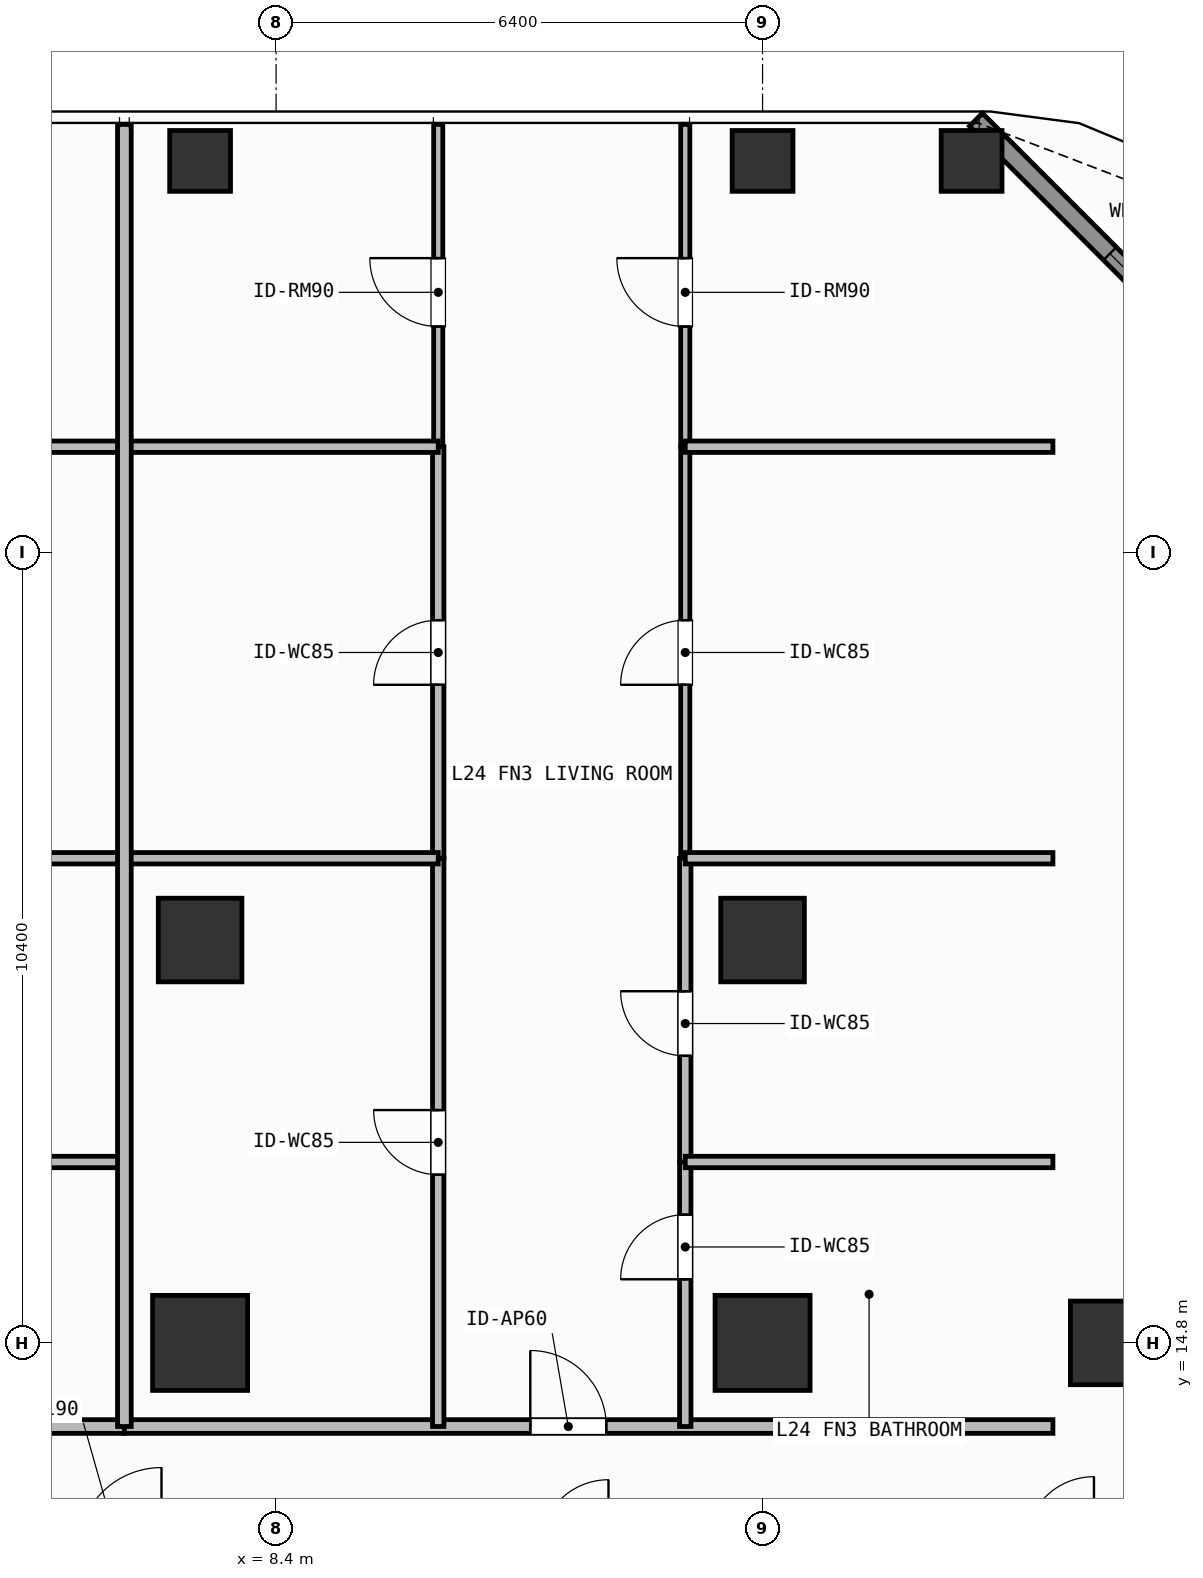
"""IFC4 building model, lengths in metres.
Left out: names, types, materials, properties, quantities, classifications, styles, units other than length and angle.
Written with IfcOpenShell. Run it as: python <this file> out.ifc"""

import sys

from ifc_helpers import new_model, si_unit, direction, frame, frame_2d, origin, origin_2d, place, context, subcontext, project, spatial, rectangle, hollow_rectangle, extrude, element, fill, save


model = new_model("IFC4")
c1 = context("Model", 3, precision=1e-05, world=origin(), true_north=direction((0.0, 1.0)))
c2 = subcontext(c1, "Body", "Model", "MODEL_VIEW")
j1 = project(units=[si_unit("LENGTHUNIT", "METRE"), si_unit("PLANEANGLEUNIT", "RADIAN")], contexts=[c1])
p1 = place(None, origin())
s1 = spatial("IfcSite", under=j1, at=p1, CompositionType="ELEMENT")
p2 = place(p1, origin())
s2 = spatial("IfcBuilding", under=s1, at=p2, CompositionType="ELEMENT")
p3 = place(p2, frame((0.0, 0.0, 96.9)))
s3 = spatial("IfcBuildingStorey", under=s2, at=p3, CompositionType="ELEMENT", Elevation=96.9)
for number, where, z_axis, x_axis in (
    (1, (7.4, 14.8, 0.0), (0.0, 0.0, 1.0), (1.0, 0.0, 0.0)),
    (2, (14.8, 14.8, 0.0), (0.0, 0.0, 1.0), (1.0, 0.0, 0.0)),
):
    element("IfcColumn", number, at=place(p3, frame(where, z_axis=z_axis, x_axis=x_axis)), inside=s3, PredefinedType="COLUMN", context=c2, shape_type="SweptSolid", body=[
        extrude(rectangle(XDim=1.25, YDim=1.25, at=origin_2d()), origin(), (0.0, 0.0, 1.0), 3.9),
    ])
for number, where, z_axis, x_axis in (
    (3, (19.4, 14.8, 0.0), (0.0, 0.0, 1.0), (1.0, 0.0, 0.0)),
    (4, (7.4, 20.1, 0.0), (0.0, 0.0, 1.0), (1.0, 0.0, 0.0)),
    (5, (14.8, 20.1, 0.0), (0.0, 0.0, 1.0), (1.0, 0.0, 0.0)),
):
    element("IfcColumn", number, at=place(p3, frame(where, z_axis=z_axis, x_axis=x_axis)), inside=s3, PredefinedType="COLUMN", context=c2, shape_type="SweptSolid", body=[
        extrude(rectangle(XDim=1.1, YDim=1.1, at=origin_2d()), origin(), (0.0, 0.0, 1.0), 3.9),
    ])
for number, where, z_axis, x_axis in (
    (6, (17.55, 30.35, 0.0), (0.0, 0.0, 1.0), (1.0, 0.0, 0.0)),
    (7, (7.4, 30.35, 0.0), (0.0, 0.0, 1.0), (1.0, 0.0, 0.0)),
    (8, (14.8, 30.35, 0.0), (0.0, 0.0, 1.0), (1.0, 0.0, 0.0)),
):
    element("IfcColumn", number, at=place(p3, frame(where, z_axis=z_axis, x_axis=x_axis)), inside=s3, PredefinedType="COLUMN", context=c2, shape_type="SweptSolid", body=[
        extrude(hollow_rectangle(XDim=0.8, YDim=0.8, WallThickness=0.036, at=origin_2d()), origin(), (0.0, 0.0, 1.0), 3.9),
    ])
p4 = place(p3, frame((17.608, 30.892, 0.0), z_axis=(0.0, 0.0, 1.0), x_axis=(0.707106781187, -0.707106781187, 0.0)))
e9 = element("IfcWall", 9, at=p4, inside=s3, PredefinedType="SOLIDWALL", context=c2, shape_type="SweptSolid", body=[
    extrude(rectangle(XDim=6.484, YDim=0.24, at=frame_2d((3.242, 0.0))), origin(), (0.0, 0.0, 1.0), 3.68),
])
p5 = place(p4, frame((2.492, 0.0, 0.8)))
e10 = element("IfcOpeningElement", 10, at=p5, cuts=e9, PredefinedType="OPENING", context=c2, shape_type="SweptSolid", body=[
    extrude(rectangle(XDim=1.5, YDim=1.85, at=frame_2d((0.75, 0.925))), frame((0.0, 0.13, 0.0), z_axis=(0.0, -1.0, 0.0), x_axis=(1.0, 0.0, 0.0)), (0.0, 0.0, 1.0), 0.26),
])
p6 = place(p3, frame((-14.808, 13.7, 0.0), z_axis=(0.0, 0.0, 1.0), x_axis=(1.0, 0.0, 0.0)))
e11 = element("IfcWall", 11, at=p6, inside=s3, PredefinedType="PARTITIONING", context=c2, shape_type="SweptSolid", body=[
    extrude(rectangle(XDim=21.212, YDim=0.18, at=frame_2d((10.606, 0.0))), origin(), (0.0, 0.0, 1.0), 3.68),
])
p7 = place(p6, frame((11.271, 0.0, 0.0)))
e12 = element("IfcOpeningElement", 12, at=p7, cuts=e11, PredefinedType="OPENING", context=c2, shape_type="SweptSolid", body=[
    extrude(rectangle(XDim=1.0, YDim=2.2, at=frame_2d((0.5, 1.1))), frame((0.0, 0.1, 0.0), z_axis=(0.0, -1.0, 0.0), x_axis=(1.0, 0.0, 0.0)), (0.0, 0.0, 1.0), 0.2),
])
p8 = place(p3, frame((6.404, 13.7, 0.0), z_axis=(0.0, 0.0, 1.0), x_axis=(1.0, 0.0, 0.0)))
e13 = element("IfcWall", 13, at=p8, inside=s3, PredefinedType="PARTITIONING", context=c2, shape_type="SweptSolid", body=[
    extrude(rectangle(XDim=12.216, YDim=0.18, at=frame_2d((6.108, 0.0))), origin(), (0.0, 0.0, 1.0), 3.68),
])
p9 = place(p8, frame((5.34, 0.0, 0.0)))
e14 = element("IfcOpeningElement", 14, at=p9, cuts=e13, PredefinedType="OPENING", context=c2, shape_type="SweptSolid", body=[
    extrude(rectangle(XDim=1.0, YDim=2.2, at=frame_2d((0.5, 1.1))), frame((0.0, 0.1, 0.0), z_axis=(0.0, -1.0, 0.0), x_axis=(1.0, 0.0, 0.0)), (0.0, 0.0, 1.0), 0.2),
])
p10 = place(p3, frame((10.533, 13.7, 0.0), z_axis=(0.0, 0.0, 1.0), x_axis=(0.0, 1.0, 0.0)))
e15 = element("IfcWall", 15, at=p10, inside=s3, PredefinedType="PARTITIONING", context=c2, shape_type="SweptSolid", body=[
    extrude(rectangle(XDim=7.476, YDim=0.15, at=frame_2d((3.738, 0.0))), origin(), (0.0, 0.0, 1.0), 3.68),
])
p11 = place(p10, frame((3.313, 0.0, 0.0)))
e16 = element("IfcOpeningElement", 16, at=p11, cuts=e15, PredefinedType="OPENING", context=c2, shape_type="SweptSolid", body=[
    extrude(rectangle(XDim=0.85, YDim=2.1, at=frame_2d((0.425, 1.05))), frame((0.0, 0.085, 0.0), z_axis=(0.0, -1.0, 0.0), x_axis=(1.0, 0.0, 0.0)), (0.0, 0.0, 1.0), 0.17),
])
p12 = place(p3, frame((10.533, 21.176, 0.0), z_axis=(0.0, 0.0, 1.0), x_axis=(0.0, 1.0, 0.0)))
e17 = element("IfcWall", 17, at=p12, inside=s3, PredefinedType="PARTITIONING", context=c2, shape_type="SweptSolid", body=[
    extrude(rectangle(XDim=5.414, YDim=0.15, at=frame_2d((2.707, 0.0))), origin(), (0.0, 0.0, 1.0), 3.68),
])
p13 = place(p12, frame((2.282, 0.0, 0.0)))
e18 = element("IfcOpeningElement", 18, at=p13, cuts=e17, PredefinedType="OPENING", context=c2, shape_type="SweptSolid", body=[
    extrude(rectangle(XDim=0.85, YDim=2.1, at=frame_2d((0.425, 1.05))), frame((0.0, 0.085, 0.0), z_axis=(0.0, -1.0, 0.0), x_axis=(1.0, 0.0, 0.0)), (0.0, 0.0, 1.0), 0.17),
])
p14 = place(p3, frame((10.533, 26.59, 0.0), z_axis=(0.0, 0.0, 1.0), x_axis=(0.0, 1.0, 0.0)))
e19 = element("IfcWall", 19, at=p14, inside=s3, PredefinedType="PARTITIONING", context=c2, shape_type="SweptSolid", body=[
    extrude(rectangle(XDim=4.24, YDim=0.12, at=frame_2d((2.12, 0.0))), origin(), (0.0, 0.0, 1.0), 3.68),
])
p15 = place(p14, frame((1.581, 0.0, 0.0)))
e20 = element("IfcOpeningElement", 20, at=p15, cuts=e19, PredefinedType="OPENING", context=c2, shape_type="SweptSolid", body=[
    extrude(rectangle(XDim=0.9, YDim=2.1, at=frame_2d((0.45, 1.05))), frame((0.0, 0.07, 0.0), z_axis=(0.0, -1.0, 0.0), x_axis=(1.0, 0.0, 0.0)), (0.0, 0.0, 1.0), 0.14),
])
p16 = place(p3, frame((13.783, 13.7, 0.0), z_axis=(0.0, 0.0, 1.0), x_axis=(0.0, 1.0, 0.0)))
e21 = element("IfcWall", 21, at=p16, inside=s3, PredefinedType="PARTITIONING", context=c2, shape_type="SweptSolid", body=[
    extrude(rectangle(XDim=3.48, YDim=0.15, at=frame_2d((1.74, 0.0))), origin(), (0.0, 0.0, 1.0), 3.68),
])
p17 = place(p16, frame((1.937, 0.0, 0.0)))
e22 = element("IfcOpeningElement", 22, at=p17, cuts=e21, PredefinedType="OPENING", context=c2, shape_type="SweptSolid", body=[
    extrude(rectangle(XDim=0.85, YDim=2.1, at=frame_2d((0.425, 1.05))), frame((0.0, 0.085, 0.0), z_axis=(0.0, -1.0, 0.0), x_axis=(1.0, 0.0, 0.0)), (0.0, 0.0, 1.0), 0.17),
])
p18 = place(p3, frame((13.783, 17.18, 0.0), z_axis=(0.0, 0.0, 1.0), x_axis=(0.0, 1.0, 0.0)))
e23 = element("IfcWall", 23, at=p18, inside=s3, PredefinedType="PARTITIONING", context=c2, shape_type="SweptSolid", body=[
    extrude(rectangle(XDim=3.996, YDim=0.15, at=frame_2d((1.998, 0.0))), origin(), (0.0, 0.0, 1.0), 3.68),
])
p19 = place(p18, frame((1.396, 0.0, 0.0)))
e24 = element("IfcOpeningElement", 24, at=p19, cuts=e23, PredefinedType="OPENING", context=c2, shape_type="SweptSolid", body=[
    extrude(rectangle(XDim=0.85, YDim=2.1, at=frame_2d((0.425, 1.05))), frame((0.0, 0.085, 0.0), z_axis=(0.0, -1.0, 0.0), x_axis=(1.0, 0.0, 0.0)), (0.0, 0.0, 1.0), 0.17),
])
p20 = place(p3, frame((13.783, 21.176, 0.0), z_axis=(0.0, 0.0, 1.0), x_axis=(0.0, 1.0, 0.0)))
e25 = element("IfcWall", 25, at=p20, inside=s3, PredefinedType="PARTITIONING", context=c2, shape_type="SweptSolid", body=[
    extrude(rectangle(XDim=5.414, YDim=0.12, at=frame_2d((2.707, 0.0))), origin(), (0.0, 0.0, 1.0), 3.68),
])
p21 = place(p20, frame((2.282, 0.0, 0.0)))
e26 = element("IfcOpeningElement", 26, at=p21, cuts=e25, PredefinedType="OPENING", context=c2, shape_type="SweptSolid", body=[
    extrude(rectangle(XDim=0.85, YDim=2.1, at=frame_2d((0.425, 1.05))), frame((0.0, 0.07, 0.0), z_axis=(0.0, -1.0, 0.0), x_axis=(1.0, 0.0, 0.0)), (0.0, 0.0, 1.0), 0.14),
])
p22 = place(p3, frame((13.783, 26.59, 0.0), z_axis=(0.0, 0.0, 1.0), x_axis=(0.0, 1.0, 0.0)))
e27 = element("IfcWall", 27, at=p22, inside=s3, PredefinedType="PARTITIONING", context=c2, shape_type="SweptSolid", body=[
    extrude(rectangle(XDim=4.24, YDim=0.12, at=frame_2d((2.12, 0.0))), origin(), (0.0, 0.0, 1.0), 3.68),
])
p23 = place(p22, frame((1.581, 0.0, 0.0)))
e28 = element("IfcOpeningElement", 28, at=p23, cuts=e27, PredefinedType="OPENING", context=c2, shape_type="SweptSolid", body=[
    extrude(rectangle(XDim=0.9, YDim=2.1, at=frame_2d((0.45, 1.05))), frame((0.0, 0.07, 0.0), z_axis=(0.0, -1.0, 0.0), x_axis=(1.0, 0.0, 0.0)), (0.0, 0.0, 1.0), 0.14),
])
for number, where, z_axis, x_axis in (
    (29, (1.967, 17.18, 0.0), (0.0, 0.0, 1.0), (1.0, 0.0, 0.0)),
    (30, (1.967, 21.176, 0.0), (0.0, 0.0, 1.0), (1.0, 0.0, 0.0)),
    (31, (1.967, 26.59, 0.0), (0.0, 0.0, 1.0), (1.0, 0.0, 0.0)),
):
    element("IfcWall", number, at=place(p3, frame(where, z_axis=z_axis, x_axis=x_axis)), inside=s3, PredefinedType="PARTITIONING", context=c2, shape_type="SweptSolid", body=[
        extrude(rectangle(XDim=4.437, YDim=0.15, at=frame_2d((2.219, 0.0))), origin(), (0.0, 0.0, 1.0), 3.68),
    ])
for number, where, z_axis, x_axis in (
    (32, (6.404, 21.176, 0.0), (0.0, 0.0, 1.0), (1.0, 0.0, 0.0)),
    (33, (6.404, 26.59, 0.0), (0.0, 0.0, 1.0), (1.0, 0.0, 0.0)),
):
    element("IfcWall", number, at=place(p3, frame(where, z_axis=z_axis, x_axis=x_axis)), inside=s3, PredefinedType="PARTITIONING", context=c2, shape_type="SweptSolid", body=[
        extrude(rectangle(XDim=4.129, YDim=0.15, at=frame_2d((2.064, 0.0))), origin(), (0.0, 0.0, 1.0), 3.68),
    ])
for number, where, z_axis, x_axis in (
    (34, (13.783, 17.18, 0.0), (0.0, 0.0, 1.0), (1.0, 0.0, 0.0)),
    (35, (13.783, 21.176, 0.0), (0.0, 0.0, 1.0), (1.0, 0.0, 0.0)),
    (36, (13.783, 26.59, 0.0), (0.0, 0.0, 1.0), (1.0, 0.0, 0.0)),
):
    element("IfcWall", number, at=place(p3, frame(where, z_axis=z_axis, x_axis=x_axis)), inside=s3, PredefinedType="PARTITIONING", context=c2, shape_type="SweptSolid", body=[
        extrude(rectangle(XDim=4.837, YDim=0.15, at=frame_2d((2.418, 0.0))), origin(), (0.0, 0.0, 1.0), 3.68),
    ])
p24 = place(p3, frame((6.404, 13.7, 0.0), z_axis=(0.0, 0.0, 1.0), x_axis=(0.0, 1.0, 0.0)))
e37 = element("IfcWall", 37, at=p24, inside=s3, PredefinedType="PARTITIONING", context=c2, shape_type="SweptSolid", body=[
    extrude(rectangle(XDim=17.13, YDim=0.18, at=frame_2d((8.565, 0.0))), origin(), (0.0, 0.0, 1.0), 3.68),
])
p25 = place(p5, origin())
e38 = element("IfcWindow", 38, at=p25, inside=s3, PartitioningType="SINGLE_PANEL", PredefinedType="WINDOW", context=c2, shape_type="SweptSolid", body=[
    extrude(rectangle(XDim=1.5, YDim=1.85, at=frame_2d((0.75, 0.925))), frame((0.0, 0.03, 0.0), z_axis=(0.0, -1.0, 0.0), x_axis=(1.0, 0.0, 0.0)), (0.0, 0.0, 1.0), 0.06),
])
fill(e10, e38)
p26 = place(p9, origin())
e39 = element("IfcDoor", 39, at=p26, inside=s3, OperationType="SINGLE_SWING_LEFT", PredefinedType="DOOR", context=c2, shape_type="SweptSolid", body=[
    extrude(rectangle(XDim=1.0, YDim=2.2, at=frame_2d((0.5, 1.1))), frame((0.0, 0.025, 0.0), z_axis=(0.0, -1.0, 0.0), x_axis=(1.0, 0.0, 0.0)), (0.0, 0.0, 1.0), 0.05),
])
fill(e14, e39)
p27 = place(p11, origin())
e40 = element("IfcDoor", 40, at=p27, inside=s3, OperationType="SINGLE_SWING_RIGHT", PredefinedType="DOOR", context=c2, shape_type="SweptSolid", body=[
    extrude(rectangle(XDim=0.85, YDim=2.1, at=frame_2d((0.425, 1.05))), frame((0.0, 0.025, 0.0), z_axis=(0.0, -1.0, 0.0), x_axis=(1.0, 0.0, 0.0)), (0.0, 0.0, 1.0), 0.05),
])
fill(e16, e40)
p28 = place(p13, origin())
e41 = element("IfcDoor", 41, at=p28, inside=s3, OperationType="SINGLE_SWING_LEFT", PredefinedType="DOOR", context=c2, shape_type="SweptSolid", body=[
    extrude(rectangle(XDim=0.85, YDim=2.1, at=frame_2d((0.425, 1.05))), frame((0.0, 0.025, 0.0), z_axis=(0.0, -1.0, 0.0), x_axis=(1.0, 0.0, 0.0)), (0.0, 0.0, 1.0), 0.05),
])
fill(e18, e41)
p29 = place(p15, origin())
e42 = element("IfcDoor", 42, at=p29, inside=s3, OperationType="SINGLE_SWING_RIGHT", PredefinedType="DOOR", context=c2, shape_type="SweptSolid", body=[
    extrude(rectangle(XDim=0.9, YDim=2.1, at=frame_2d((0.45, 1.05))), frame((0.0, 0.025, 0.0), z_axis=(0.0, -1.0, 0.0), x_axis=(1.0, 0.0, 0.0)), (0.0, 0.0, 1.0), 0.05),
])
fill(e20, e42)
p30 = place(p17, origin())
e43 = element("IfcDoor", 43, at=p30, inside=s3, OperationType="SINGLE_SWING_LEFT", PredefinedType="DOOR", context=c2, shape_type="SweptSolid", body=[
    extrude(rectangle(XDim=0.85, YDim=2.1, at=frame_2d((0.425, 1.05))), frame((0.0, 0.025, 0.0), z_axis=(0.0, -1.0, 0.0), x_axis=(1.0, 0.0, 0.0)), (0.0, 0.0, 1.0), 0.05),
])
fill(e22, e43)
p31 = place(p19, origin())
e44 = element("IfcDoor", 44, at=p31, inside=s3, OperationType="SINGLE_SWING_RIGHT", PredefinedType="DOOR", context=c2, shape_type="SweptSolid", body=[
    extrude(rectangle(XDim=0.85, YDim=2.1, at=frame_2d((0.425, 1.05))), frame((0.0, 0.025, 0.0), z_axis=(0.0, -1.0, 0.0), x_axis=(1.0, 0.0, 0.0)), (0.0, 0.0, 1.0), 0.05),
])
fill(e24, e44)
p32 = place(p21, origin())
e45 = element("IfcDoor", 45, at=p32, inside=s3, OperationType="SINGLE_SWING_LEFT", PredefinedType="DOOR", context=c2, shape_type="SweptSolid", body=[
    extrude(rectangle(XDim=0.85, YDim=2.1, at=frame_2d((0.425, 1.05))), frame((0.0, 0.025, 0.0), z_axis=(0.0, -1.0, 0.0), x_axis=(1.0, 0.0, 0.0)), (0.0, 0.0, 1.0), 0.05),
])
fill(e26, e45)
p33 = place(p23, origin())
e46 = element("IfcDoor", 46, at=p33, inside=s3, OperationType="SINGLE_SWING_RIGHT", PredefinedType="DOOR", context=c2, shape_type="SweptSolid", body=[
    extrude(rectangle(XDim=0.9, YDim=2.1, at=frame_2d((0.45, 1.05))), frame((0.0, 0.025, 0.0), z_axis=(0.0, -1.0, 0.0), x_axis=(1.0, 0.0, 0.0)), (0.0, 0.0, 1.0), 0.05),
])
fill(e28, e46)
save(model, sys.argv[1])
